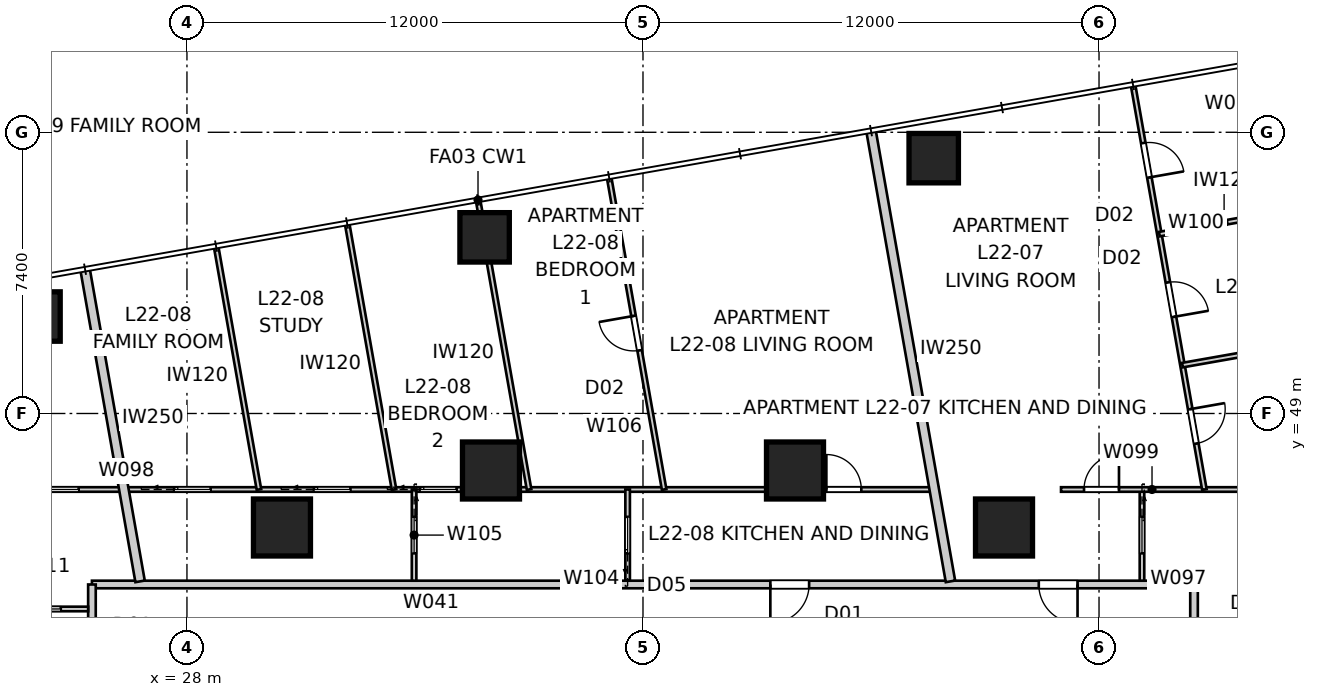
"""IFC4 building model, lengths in metres.
Left out: names, types, materials, properties, quantities, classifications, styles, units other than length and angle.
Written with IfcOpenShell. Run it as: python <this file> out.ifc"""

import sys

from ifc_helpers import new_model, si_unit, direction, frame, frame_2d, origin, origin_2d, place, context, subcontext, project, spatial, rectangle, extrude, element, fill, save


model = new_model("IFC4")
c1 = context("Model", 3, precision=1e-05, world=origin(), true_north=direction((0.0, 1.0)))
c2 = subcontext(c1, "Body", "Model", "MODEL_VIEW")
j1 = project(units=[si_unit("LENGTHUNIT", "METRE"), si_unit("PLANEANGLEUNIT", "RADIAN")], contexts=[c1])
p1 = place(None, origin())
s1 = spatial("IfcSite", under=j1, at=p1, CompositionType="ELEMENT")
p2 = place(p1, origin())
s2 = spatial("IfcBuilding", under=s1, at=p2, CompositionType="ELEMENT")
p3 = place(p2, frame((0.0, 0.0, 82.8)))
s3 = spatial("IfcBuildingStorey", under=s2, at=p3, CompositionType="ELEMENT", Elevation=82.8)
for number, where, z_axis, x_axis in (
    (1, (47.65, 55.719, 0.0), (0.0, 0.0, 1.0), (1.0, 0.0, 0.0)),
    (2, (35.833, 53.635, 0.0), (0.0, 0.0, 1.0), (1.0, 0.0, 0.0)),
    (3, (24.015, 51.552, 0.0), (0.0, 0.0, 1.0), (1.0, 0.0, 0.0)),
):
    element("IfcColumn", number, at=place(p3, frame(where, z_axis=z_axis, x_axis=x_axis)), inside=s3, PredefinedType="COLUMN", context=c2, shape_type="SweptSolid", body=[
        extrude(rectangle(XDim=1.3, YDim=1.3, at=origin_2d()), origin(), (0.0, 0.0, 1.0), 3.4),
    ])
for number, where, z_axis, x_axis in (
    (4, (49.5, 46.0, 0.0), (0.0, 0.0, 1.0), (1.0, 0.0, 0.0)),
    (5, (44.0, 47.5, 0.0), (0.0, 0.0, 1.0), (1.0, 0.0, 0.0)),
    (6, (36.0, 47.5, 0.0), (0.0, 0.0, 1.0), (1.0, 0.0, 0.0)),
    (7, (30.5, 46.0, 0.0), (0.0, 0.0, 1.0), (1.0, 0.0, 0.0)),
):
    element("IfcColumn", number, at=place(p3, frame(where, z_axis=z_axis, x_axis=x_axis)), inside=s3, PredefinedType="COLUMN", context=c2, shape_type="SweptSolid", body=[
        extrude(rectangle(XDim=1.5, YDim=1.5, at=origin_2d()), origin(), (0.0, 0.0, 1.0), 3.4),
    ])
p4 = place(p3, frame((54.5, 15.5, 0.0), z_axis=(0.0, 0.0, 1.0), x_axis=(0.0, 1.0, 0.0)))
e8 = element("IfcWall", 8, at=p4, inside=s3, PredefinedType="PARTITIONING", context=c2, shape_type="SweptSolid", body=[
    extrude(rectangle(XDim=29.0, YDim=0.2, at=frame_2d((14.5, 0.0))), origin(), (0.0, 0.0, 1.0), 3.25),
])
p5 = place(p4, frame((21.815, 0.0, 0.0)))
e9 = element("IfcOpeningElement", 9, at=p5, cuts=e8, PredefinedType="OPENING", context=c2, shape_type="SweptSolid", body=[
    extrude(rectangle(XDim=1.02, YDim=2.34, at=frame_2d((0.51, 1.17))), frame((0.0, 0.11, 0.0), z_axis=(0.0, -1.0, 0.0), x_axis=(1.0, 0.0, 0.0)), (0.0, 0.0, 1.0), 0.22),
])
p6 = place(p4, frame((2.855, 0.0, 0.0)))
e10 = element("IfcOpeningElement", 10, at=p6, cuts=e8, PredefinedType="OPENING", context=c2, shape_type="SweptSolid", body=[
    extrude(rectangle(XDim=1.02, YDim=2.1, at=frame_2d((0.51, 1.05))), frame((0.0, 0.11, 0.0), z_axis=(0.0, -1.0, 0.0), x_axis=(1.0, 0.0, 0.0)), (0.0, 0.0, 1.0), 0.22),
])
p7 = place(p3, frame((54.5, 44.5, 0.0), z_axis=(0.0, 0.0, 1.0), x_axis=(-1.0, 0.0, 0.0)))
e11 = element("IfcWall", 11, at=p7, inside=s3, PredefinedType="PARTITIONING", context=c2, shape_type="SweptSolid", body=[
    extrude(rectangle(XDim=29.0, YDim=0.2, at=frame_2d((14.5, 0.0))), origin(), (0.0, 0.0, 1.0), 3.25),
])
p8 = place(p7, frame((10.129, 0.0, 0.0)))
e12 = element("IfcOpeningElement", 12, at=p8, cuts=e11, PredefinedType="OPENING", context=c2, shape_type="SweptSolid", body=[
    extrude(rectangle(XDim=1.02, YDim=2.34, at=frame_2d((0.51, 1.17))), frame((0.0, 0.11, 0.0), z_axis=(0.0, -1.0, 0.0), x_axis=(1.0, 0.0, 0.0)), (0.0, 0.0, 1.0), 0.22),
])
p9 = place(p7, frame((3.065, 0.0, 0.0)))
e13 = element("IfcOpeningElement", 13, at=p9, cuts=e11, PredefinedType="OPENING", context=c2, shape_type="SweptSolid", body=[
    extrude(rectangle(XDim=1.02, YDim=2.1, at=frame_2d((0.51, 1.05))), frame((0.0, 0.11, 0.0), z_axis=(0.0, -1.0, 0.0), x_axis=(1.0, 0.0, 0.0)), (0.0, 0.0, 1.0), 0.22),
])
p10 = place(p3, frame((25.5, 44.5, 0.0), z_axis=(0.0, 0.0, 1.0), x_axis=(0.0, -1.0, 0.0)))
e14 = element("IfcWall", 14, at=p10, inside=s3, PredefinedType="PARTITIONING", context=c2, shape_type="SweptSolid", body=[
    extrude(rectangle(XDim=29.0, YDim=0.2, at=frame_2d((14.5, 0.0))), origin(), (0.0, 0.0, 1.0), 3.25),
])
p11 = place(p10, frame((12.263, 0.0, 0.0)))
e15 = element("IfcOpeningElement", 15, at=p11, cuts=e14, PredefinedType="OPENING", context=c2, shape_type="SweptSolid", body=[
    extrude(rectangle(XDim=1.02, YDim=2.34, at=frame_2d((0.51, 1.17))), frame((0.0, 0.11, 0.0), z_axis=(0.0, -1.0, 0.0), x_axis=(1.0, 0.0, 0.0)), (0.0, 0.0, 1.0), 0.22),
])
p12 = place(p10, frame((2.018, 0.0, 0.0)))
e16 = element("IfcOpeningElement", 16, at=p12, cuts=e14, PredefinedType="OPENING", context=c2, shape_type="SweptSolid", body=[
    extrude(rectangle(XDim=1.02, YDim=2.34, at=frame_2d((0.51, 1.17))), frame((0.0, 0.11, 0.0), z_axis=(0.0, -1.0, 0.0), x_axis=(1.0, 0.0, 0.0)), (0.0, 0.0, 1.0), 0.22),
])
p13 = place(p3, frame((62.797, 44.682, 0.0), z_axis=(0.0, 0.0, 1.0), x_axis=(-0.984807121942, -0.173651756605, 0.0)))
e17 = element("IfcWall", 17, at=p13, inside=s3, PredefinedType="PARTITIONING", context=c2, shape_type="SweptSolid", body=[
    extrude(rectangle(XDim=8.341, YDim=0.25, at=frame_2d((4.171, 0.0))), origin(), (0.0, 0.0, 1.0), 3.25),
])
p14 = place(p3, frame((45.999, 56.444, 0.0), z_axis=(0.0, 0.0, 1.0), x_axis=(0.173654664517, -0.984806609184, 0.0)))
e18 = element("IfcWall", 18, at=p14, inside=s3, PredefinedType="PARTITIONING", context=c2, shape_type="SweptSolid", body=[
    extrude(rectangle(XDim=12.044, YDim=0.25, at=frame_2d((6.022, 0.0))), origin(), (0.0, 0.0, 1.0), 3.25),
])
p15 = place(p3, frame((25.318, 52.797, 0.0), z_axis=(0.0, 0.0, 1.0), x_axis=(0.173651756605, -0.984807121942, 0.0)))
e19 = element("IfcWall", 19, at=p15, inside=s3, PredefinedType="PARTITIONING", context=c2, shape_type="SweptSolid", body=[
    extrude(rectangle(XDim=8.341, YDim=0.25, at=frame_2d((4.171, 0.0))), origin(), (0.0, 0.0, 1.0), 3.25),
])
p16 = place(p3, frame((53.13, 47.0, 0.0), z_axis=(0.0, 0.0, 1.0), x_axis=(0.0, -1.0, 0.0)))
e20 = element("IfcWall", 20, at=p16, inside=s3, PredefinedType="PARTITIONING", context=c2, shape_type="SweptSolid", body=[
    extrude(rectangle(XDim=2.4, YDim=0.12, at=frame_2d((1.2, 0.0))), origin(), (0.0, 0.0, 1.0), 3.25),
])
p17 = place(p16, frame((0.72, 0.0, 0.0)))
e21 = element("IfcOpeningElement", 21, at=p17, cuts=e20, PredefinedType="OPENING", context=c2, shape_type="SweptSolid", body=[
    extrude(rectangle(XDim=0.96, YDim=2.1, at=frame_2d((0.48, 1.05))), frame((0.0, 0.07, 0.0), z_axis=(0.0, -1.0, 0.0), x_axis=(1.0, 0.0, 0.0)), (0.0, 0.0, 1.0), 0.14),
])
p18 = place(p3, frame((23.0, 47.0, 0.0), z_axis=(0.0, 0.0, 1.0), x_axis=(1.0, 0.0, 0.0)))
e22 = element("IfcWall", 22, at=p18, inside=s3, PredefinedType="PARTITIONING", context=c2, shape_type="SweptSolid", body=[
    extrude(rectangle(XDim=24.771, YDim=0.12, at=frame_2d((12.386, 0.0))), origin(), (0.0, 0.0, 1.0), 2.55),
])
p19 = place(p18, frame((21.825, 0.0, 0.0)))
e23 = element("IfcOpeningElement", 23, at=p19, cuts=e22, PredefinedType="OPENING", context=c2, shape_type="SweptSolid", body=[
    extrude(rectangle(XDim=0.92, YDim=2.34, at=frame_2d((0.46, 1.17))), frame((0.0, 0.07, 0.0), z_axis=(0.0, -1.0, 0.0), x_axis=(1.0, 0.0, 0.0)), (0.0, 0.0, 1.0), 0.14),
])
p20 = place(p18, frame((11.135, 0.0, 0.0)))
e24 = element("IfcOpeningElement", 24, at=p20, cuts=e22, PredefinedType="OPENING", context=c2, shape_type="SweptSolid", body=[
    extrude(rectangle(XDim=0.96, YDim=2.1, at=frame_2d((0.48, 1.05))), frame((0.0, 0.07, 0.0), z_axis=(0.0, -1.0, 0.0), x_axis=(1.0, 0.0, 0.0)), (0.0, 0.0, 1.0), 0.14),
])
p21 = place(p18, frame((1.19, 0.0, 0.0)))
e25 = element("IfcOpeningElement", 25, at=p21, cuts=e22, PredefinedType="OPENING", context=c2, shape_type="SweptSolid", body=[
    extrude(rectangle(XDim=0.96, YDim=2.1, at=frame_2d((0.48, 1.05))), frame((0.0, 0.07, 0.0), z_axis=(0.0, -1.0, 0.0), x_axis=(1.0, 0.0, 0.0)), (0.0, 0.0, 1.0), 0.14),
])
p22 = place(p18, frame((8.342, 0.0, 0.0)))
e26 = element("IfcOpeningElement", 26, at=p22, cuts=e22, PredefinedType="OPENING", context=c2, shape_type="SweptSolid", body=[
    extrude(rectangle(XDim=0.96, YDim=2.1, at=frame_2d((0.48, 1.05))), frame((0.0, 0.07, 0.0), z_axis=(0.0, -1.0, 0.0), x_axis=(1.0, 0.0, 0.0)), (0.0, 0.0, 1.0), 0.14),
])
p23 = place(p18, frame((4.663, 0.0, 0.0)))
e27 = element("IfcOpeningElement", 27, at=p23, cuts=e22, PredefinedType="OPENING", context=c2, shape_type="SweptSolid", body=[
    extrude(rectangle(XDim=0.96, YDim=2.1, at=frame_2d((0.48, 1.05))), frame((0.0, 0.07, 0.0), z_axis=(0.0, -1.0, 0.0), x_axis=(1.0, 0.0, 0.0)), (0.0, 0.0, 1.0), 0.14),
])
p24 = place(p3, frame((51.0, 47.0, 0.0), z_axis=(0.0, 0.0, 1.0), x_axis=(1.0, 0.0, 0.0)))
e28 = element("IfcWall", 28, at=p24, inside=s3, PredefinedType="PARTITIONING", context=c2, shape_type="SweptSolid", body=[
    extrude(rectangle(XDim=4.789, YDim=0.12, at=frame_2d((2.395, 0.0))), origin(), (0.0, 0.0, 1.0), 2.638),
])
p25 = place(p24, frame((0.605, 0.0, 0.0)))
e29 = element("IfcOpeningElement", 29, at=p25, cuts=e28, PredefinedType="OPENING", context=c2, shape_type="SweptSolid", body=[
    extrude(rectangle(XDim=0.92, YDim=2.34, at=frame_2d((0.46, 1.17))), frame((0.0, 0.07, 0.0), z_axis=(0.0, -1.0, 0.0), x_axis=(1.0, 0.0, 0.0)), (0.0, 0.0, 1.0), 0.14),
])
p26 = place(p3, frame((52.9, 57.62, 0.0), z_axis=(0.0, 0.0, 1.0), x_axis=(0.173651010046, -0.984807253583, 0.0)))
e30 = element("IfcWall", 30, at=p26, inside=s3, PredefinedType="PARTITIONING", context=c2, shape_type="SweptSolid", body=[
    extrude(rectangle(XDim=10.783, YDim=0.12, at=frame_2d((5.392, 0.0))), origin(), (0.0, 0.0, 1.0), 3.25),
])
p27 = place(p26, frame((1.525, 0.0, 0.0)))
e31 = element("IfcOpeningElement", 31, at=p27, cuts=e30, PredefinedType="OPENING", context=c2, shape_type="SweptSolid", body=[
    extrude(rectangle(XDim=0.92, YDim=2.34, at=frame_2d((0.46, 1.17))), frame((0.0, 0.07, 0.0), z_axis=(0.0, -1.0, 0.0), x_axis=(1.0, 0.0, 0.0)), (0.0, 0.0, 1.0), 0.14),
])
p28 = place(p26, frame((5.25, 0.0, 0.0)))
e32 = element("IfcOpeningElement", 32, at=p28, cuts=e30, PredefinedType="OPENING", context=c2, shape_type="SweptSolid", body=[
    extrude(rectangle(XDim=0.92, YDim=2.34, at=frame_2d((0.46, 1.17))), frame((0.0, 0.07, 0.0), z_axis=(0.0, -1.0, 0.0), x_axis=(1.0, 0.0, 0.0)), (0.0, 0.0, 1.0), 0.14),
])
p29 = place(p26, frame((8.637, 0.0, 0.0)))
e33 = element("IfcOpeningElement", 33, at=p29, cuts=e30, PredefinedType="OPENING", context=c2, shape_type="SweptSolid", body=[
    extrude(rectangle(XDim=0.92, YDim=2.34, at=frame_2d((0.46, 1.17))), frame((0.0, 0.07, 0.0), z_axis=(0.0, -1.0, 0.0), x_axis=(1.0, 0.0, 0.0)), (0.0, 0.0, 1.0), 0.14),
])
p30 = place(p3, frame((61.542, 51.568, 0.0), z_axis=(0.0, 0.0, 1.0), x_axis=(-0.984807929323, -0.173647177755, 0.0)))
e34 = element("IfcWall", 34, at=p30, inside=s3, PredefinedType="PARTITIONING", context=c2, shape_type="SweptSolid", body=[
    extrude(rectangle(XDim=7.46, YDim=0.12, at=frame_2d((3.73, 0.0))), origin(), (0.0, 0.0, 1.0), 3.25),
])
p31 = place(p3, frame((53.588, 53.72, 0.0), z_axis=(0.0, 0.0, 1.0), x_axis=(0.984805572884, 0.173660541335, 0.0)))
e35 = element("IfcWall", 35, at=p31, inside=s3, PredefinedType="PARTITIONING", context=c2, shape_type="SweptSolid", body=[
    extrude(rectangle(XDim=3.46, YDim=0.12, at=frame_2d((1.73, 0.0))), origin(), (0.0, 0.0, 1.0), 3.25),
])
p32 = place(p3, frame((39.596, 44.6, 0.0), z_axis=(0.0, 0.0, 1.0), x_axis=(0.0, 1.0, 0.0)))
e36 = element("IfcWall", 36, at=p32, inside=s3, PredefinedType="PARTITIONING", context=c2, shape_type="SweptSolid", body=[
    extrude(rectangle(XDim=2.4, YDim=0.12, at=frame_2d((1.2, 0.0))), origin(), (0.0, 0.0, 1.0), 3.25),
])
p33 = place(p32, frame((0.72, 0.0, 0.0)))
e37 = element("IfcOpeningElement", 37, at=p33, cuts=e36, PredefinedType="OPENING", context=c2, shape_type="SweptSolid", body=[
    extrude(rectangle(XDim=0.96, YDim=2.1, at=frame_2d((0.48, 1.05))), frame((0.0, 0.07, 0.0), z_axis=(0.0, -1.0, 0.0), x_axis=(1.0, 0.0, 0.0)), (0.0, 0.0, 1.0), 0.14),
])
p34 = place(p3, frame((33.977, 47.0, 0.0), z_axis=(0.0, 0.0, 1.0), x_axis=(0.0, -1.0, 0.0)))
e38 = element("IfcWall", 38, at=p34, inside=s3, PredefinedType="PARTITIONING", context=c2, shape_type="SweptSolid", body=[
    extrude(rectangle(XDim=2.4, YDim=0.12, at=frame_2d((1.2, 0.0))), origin(), (0.0, 0.0, 1.0), 3.25),
])
p35 = place(p34, frame((0.72, 0.0, 0.0)))
e39 = element("IfcOpeningElement", 39, at=p35, cuts=e38, PredefinedType="OPENING", context=c2, shape_type="SweptSolid", body=[
    extrude(rectangle(XDim=0.96, YDim=2.1, at=frame_2d((0.48, 1.05))), frame((0.0, 0.07, 0.0), z_axis=(0.0, -1.0, 0.0), x_axis=(1.0, 0.0, 0.0)), (0.0, 0.0, 1.0), 0.14),
])
p36 = place(p3, frame((40.556, 47.0, 0.0), z_axis=(0.0, 0.0, 1.0), x_axis=(-0.173647980238, 0.984807787824, 0.0)))
e40 = element("IfcWall", 40, at=p36, inside=s3, PredefinedType="PARTITIONING", context=c2, shape_type="SweptSolid", body=[
    extrude(rectangle(XDim=8.315, YDim=0.12, at=frame_2d((4.157, 0.0))), origin(), (0.0, 0.0, 1.0), 3.25),
])
p37 = place(p36, frame((3.718, 0.0, 0.0)))
e41 = element("IfcOpeningElement", 41, at=p37, cuts=e40, PredefinedType="OPENING", context=c2, shape_type="SweptSolid", body=[
    extrude(rectangle(XDim=0.92, YDim=2.34, at=frame_2d((0.46, 1.17))), frame((0.0, 0.07, 0.0), z_axis=(0.0, -1.0, 0.0), x_axis=(1.0, 0.0, 0.0)), (0.0, 0.0, 1.0), 0.14),
])
p38 = place(p3, frame((37.002, 47.0, 0.0), z_axis=(0.0, 0.0, 1.0), x_axis=(-0.173644207293, 0.984808453088, 0.0)))
e42 = element("IfcWall", 42, at=p38, inside=s3, PredefinedType="PARTITIONING", context=c2, shape_type="SweptSolid", body=[
    extrude(rectangle(XDim=7.698, YDim=0.12, at=frame_2d((3.849, 0.0))), origin(), (0.0, 0.0, 1.0), 3.25),
])
p39 = place(p3, frame((33.448, 47.0, 0.0), z_axis=(0.0, 0.0, 1.0), x_axis=(-0.173639776761, 0.984809234282, 0.0)))
e43 = element("IfcWall", 43, at=p39, inside=s3, PredefinedType="PARTITIONING", context=c2, shape_type="SweptSolid", body=[
    extrude(rectangle(XDim=7.081, YDim=0.12, at=frame_2d((3.541, 0.0))), origin(), (0.0, 0.0, 1.0), 3.25),
])
p40 = place(p3, frame((29.895, 47.0, 0.0), z_axis=(0.0, 0.0, 1.0), x_axis=(-0.173640959323, 0.984809025774, 0.0)))
e44 = element("IfcWall", 44, at=p40, inside=s3, PredefinedType="PARTITIONING", context=c2, shape_type="SweptSolid", body=[
    extrude(rectangle(XDim=6.463, YDim=0.12, at=frame_2d((3.232, 0.0))), origin(), (0.0, 0.0, 1.0), 3.25),
])
p41 = place(p3, frame((23.0, 43.856, 0.0), z_axis=(0.0, 0.0, 1.0), x_axis=(1.0, 0.0, 0.0)))
e45 = element("IfcWall", 45, at=p41, inside=s3, PredefinedType="PARTITIONING", context=c2, shape_type="SweptSolid", body=[
    extrude(rectangle(XDim=2.4, YDim=0.12, at=frame_2d((1.2, 0.0))), origin(), (0.0, 0.0, 1.0), 3.25),
])
p42 = place(p41, frame((0.72, 0.0, 0.0)))
e46 = element("IfcOpeningElement", 46, at=p42, cuts=e45, PredefinedType="OPENING", context=c2, shape_type="SweptSolid", body=[
    extrude(rectangle(XDim=0.96, YDim=2.1, at=frame_2d((0.48, 1.05))), frame((0.0, 0.07, 0.0), z_axis=(0.0, -1.0, 0.0), x_axis=(1.0, 0.0, 0.0)), (0.0, 0.0, 1.0), 0.14),
])
p43 = place(p8, origin())
e47 = element("IfcDoor", 47, at=p43, inside=s3, OperationType="SINGLE_SWING_RIGHT", PredefinedType="DOOR", context=c2, shape_type="SweptSolid", body=[
    extrude(rectangle(XDim=1.02, YDim=2.34, at=frame_2d((0.51, 1.17))), frame((0.0, 0.025, 0.0), z_axis=(0.0, -1.0, 0.0), x_axis=(1.0, 0.0, 0.0)), (0.0, 0.0, 1.0), 0.05),
])
fill(e12, e47)
p44 = place(p9, origin())
e48 = element("IfcDoor", 48, at=p44, inside=s3, OperationType="SINGLE_SWING_LEFT", PredefinedType="DOOR", context=c2, shape_type="SweptSolid", body=[
    extrude(rectangle(XDim=1.02, YDim=2.1, at=frame_2d((0.51, 1.05))), frame((0.0, 0.025, 0.0), z_axis=(0.0, -1.0, 0.0), x_axis=(1.0, 0.0, 0.0)), (0.0, 0.0, 1.0), 0.05),
])
fill(e13, e48)
p45 = place(p19, origin())
e49 = element("IfcDoor", 49, at=p45, inside=s3, OperationType="SINGLE_SWING_LEFT", PredefinedType="DOOR", context=c2, shape_type="SweptSolid", body=[
    extrude(rectangle(XDim=0.92, YDim=2.34, at=frame_2d((0.46, 1.17))), frame((0.0, 0.025, 0.0), z_axis=(0.0, -1.0, 0.0), x_axis=(1.0, 0.0, 0.0)), (0.0, 0.0, 1.0), 0.05),
])
fill(e23, e49)
p46 = place(p33, origin())
e50 = element("IfcDoor", 50, at=p46, inside=s3, OperationType="SLIDING_TO_LEFT", PredefinedType="DOOR", context=c2, shape_type="SweptSolid", body=[
    extrude(rectangle(XDim=0.96, YDim=2.1, at=frame_2d((0.48, 1.05))), frame((0.0, 0.025, 0.0), z_axis=(0.0, -1.0, 0.0), x_axis=(1.0, 0.0, 0.0)), (0.0, 0.0, 1.0), 0.05),
])
fill(e37, e50)
p47 = place(p17, origin())
e51 = element("IfcDoor", 51, at=p47, inside=s3, OperationType="SLIDING_TO_LEFT", PredefinedType="DOOR", context=c2, shape_type="SweptSolid", body=[
    extrude(rectangle(XDim=0.96, YDim=2.1, at=frame_2d((0.48, 1.05))), frame((0.0, 0.025, 0.0), z_axis=(0.0, -1.0, 0.0), x_axis=(1.0, 0.0, 0.0)), (0.0, 0.0, 1.0), 0.05),
])
fill(e21, e51)
p48 = place(p25, origin())
e52 = element("IfcDoor", 52, at=p48, inside=s3, OperationType="SINGLE_SWING_RIGHT", PredefinedType="DOOR", context=c2, shape_type="SweptSolid", body=[
    extrude(rectangle(XDim=0.92, YDim=2.34, at=frame_2d((0.46, 1.17))), frame((0.0, 0.025, 0.0), z_axis=(0.0, -1.0, 0.0), x_axis=(1.0, 0.0, 0.0)), (0.0, 0.0, 1.0), 0.05),
])
fill(e29, e52)
p49 = place(p42, origin())
e53 = element("IfcDoor", 53, at=p49, inside=s3, OperationType="SLIDING_TO_LEFT", PredefinedType="DOOR", context=c2, shape_type="SweptSolid", body=[
    extrude(rectangle(XDim=0.96, YDim=2.1, at=frame_2d((0.48, 1.05))), frame((0.0, 0.025, 0.0), z_axis=(0.0, -1.0, 0.0), x_axis=(1.0, 0.0, 0.0)), (0.0, 0.0, 1.0), 0.05),
])
fill(e46, e53)
p50 = place(p37, origin())
e54 = element("IfcDoor", 54, at=p50, inside=s3, OperationType="SINGLE_SWING_RIGHT", PredefinedType="DOOR", context=c2, shape_type="SweptSolid", body=[
    extrude(rectangle(XDim=0.92, YDim=2.34, at=frame_2d((0.46, 1.17))), frame((0.0, 0.025, 0.0), z_axis=(0.0, -1.0, 0.0), x_axis=(1.0, 0.0, 0.0)), (0.0, 0.0, 1.0), 0.05),
])
fill(e41, e54)
p51 = place(p20, origin())
e55 = element("IfcDoor", 55, at=p51, inside=s3, OperationType="SLIDING_TO_LEFT", PredefinedType="DOOR", context=c2, shape_type="SweptSolid", body=[
    extrude(rectangle(XDim=0.96, YDim=2.1, at=frame_2d((0.48, 1.05))), frame((0.0, 0.025, 0.0), z_axis=(0.0, -1.0, 0.0), x_axis=(1.0, 0.0, 0.0)), (0.0, 0.0, 1.0), 0.05),
])
fill(e24, e55)
p52 = place(p35, origin())
e56 = element("IfcDoor", 56, at=p52, inside=s3, OperationType="SLIDING_TO_LEFT", PredefinedType="DOOR", context=c2, shape_type="SweptSolid", body=[
    extrude(rectangle(XDim=0.96, YDim=2.1, at=frame_2d((0.48, 1.05))), frame((0.0, 0.025, 0.0), z_axis=(0.0, -1.0, 0.0), x_axis=(1.0, 0.0, 0.0)), (0.0, 0.0, 1.0), 0.05),
])
fill(e39, e56)
p53 = place(p27, origin())
e57 = element("IfcDoor", 57, at=p53, inside=s3, OperationType="SINGLE_SWING_RIGHT", PredefinedType="DOOR", context=c2, shape_type="SweptSolid", body=[
    extrude(rectangle(XDim=0.92, YDim=2.34, at=frame_2d((0.46, 1.17))), frame((0.0, 0.025, 0.0), z_axis=(0.0, -1.0, 0.0), x_axis=(1.0, 0.0, 0.0)), (0.0, 0.0, 1.0), 0.05),
])
fill(e31, e57)
p54 = place(p28, origin())
e58 = element("IfcDoor", 58, at=p54, inside=s3, OperationType="SINGLE_SWING_RIGHT", PredefinedType="DOOR", context=c2, shape_type="SweptSolid", body=[
    extrude(rectangle(XDim=0.92, YDim=2.34, at=frame_2d((0.46, 1.17))), frame((0.0, 0.025, 0.0), z_axis=(0.0, -1.0, 0.0), x_axis=(1.0, 0.0, 0.0)), (0.0, 0.0, 1.0), 0.05),
])
fill(e32, e58)
p55 = place(p29, origin())
e59 = element("IfcDoor", 59, at=p55, inside=s3, OperationType="SINGLE_SWING_LEFT", PredefinedType="DOOR", context=c2, shape_type="SweptSolid", body=[
    extrude(rectangle(XDim=0.92, YDim=2.34, at=frame_2d((0.46, 1.17))), frame((0.0, 0.025, 0.0), z_axis=(0.0, -1.0, 0.0), x_axis=(1.0, 0.0, 0.0)), (0.0, 0.0, 1.0), 0.05),
])
fill(e33, e59)
p56 = place(p21, origin())
e60 = element("IfcDoor", 60, at=p56, inside=s3, OperationType="SLIDING_TO_LEFT", PredefinedType="DOOR", context=c2, shape_type="SweptSolid", body=[
    extrude(rectangle(XDim=0.96, YDim=2.1, at=frame_2d((0.48, 1.05))), frame((0.0, 0.025, 0.0), z_axis=(0.0, -1.0, 0.0), x_axis=(1.0, 0.0, 0.0)), (0.0, 0.0, 1.0), 0.05),
])
fill(e25, e60)
p57 = place(p22, origin())
e61 = element("IfcDoor", 61, at=p57, inside=s3, OperationType="SLIDING_TO_LEFT", PredefinedType="DOOR", context=c2, shape_type="SweptSolid", body=[
    extrude(rectangle(XDim=0.96, YDim=2.1, at=frame_2d((0.48, 1.05))), frame((0.0, 0.025, 0.0), z_axis=(0.0, -1.0, 0.0), x_axis=(1.0, 0.0, 0.0)), (0.0, 0.0, 1.0), 0.05),
])
fill(e26, e61)
p58 = place(p23, origin())
e62 = element("IfcDoor", 62, at=p58, inside=s3, OperationType="SLIDING_TO_LEFT", PredefinedType="DOOR", context=c2, shape_type="SweptSolid", body=[
    extrude(rectangle(XDim=0.96, YDim=2.1, at=frame_2d((0.48, 1.05))), frame((0.0, 0.025, 0.0), z_axis=(0.0, -1.0, 0.0), x_axis=(1.0, 0.0, 0.0)), (0.0, 0.0, 1.0), 0.05),
])
fill(e27, e62)
save(model, sys.argv[1])
